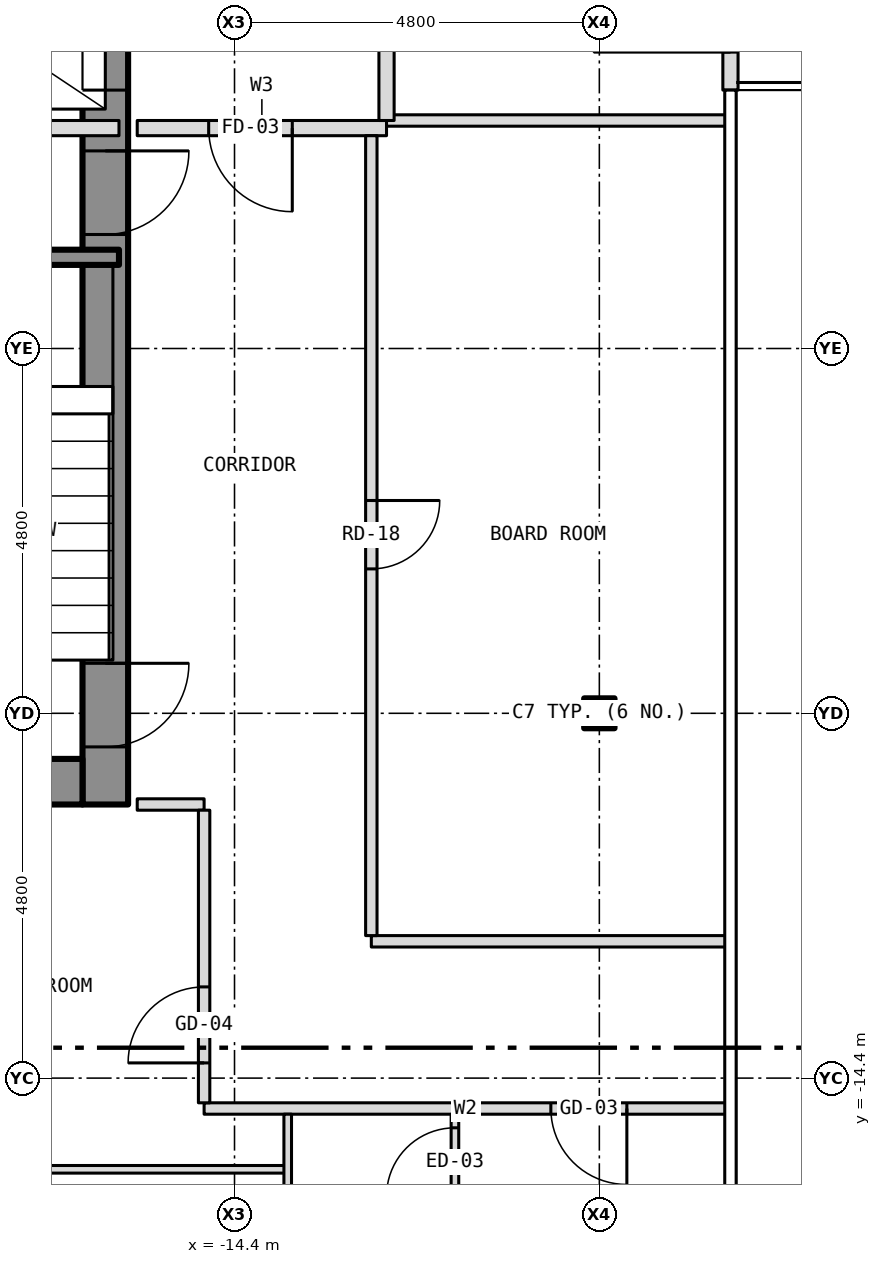
"""IFC4 building model, lengths in metres.
Left out: names, types, materials, properties, quantities, classifications, styles, units other than length and angle.
Written with IfcOpenShell. Run it as: python <this file> out.ifc"""

import sys

from ifc_helpers import new_model, si_unit, direction, frame, frame_2d, origin, origin_2d, place, context, subcontext, project, spatial, rectangle, i_section, extrude, element, fill, save


model = new_model("IFC4")
c1 = context("Model", 3, precision=1e-05, world=origin(), true_north=direction((0.0, 1.0)))
c2 = subcontext(c1, "Body", "Model", "MODEL_VIEW")
j1 = project(units=[si_unit("LENGTHUNIT", "METRE"), si_unit("PLANEANGLEUNIT", "RADIAN")], contexts=[c1])
p1 = place(None, origin())
s1 = spatial("IfcSite", under=j1, at=p1, CompositionType="ELEMENT")
p2 = place(p1, origin())
s2 = spatial("IfcBuilding", under=s1, at=p2, CompositionType="ELEMENT")
p3 = place(p2, frame((0.0, 0.0, 131.0)))
s3 = spatial("IfcBuildingStorey", under=s2, at=p3, CompositionType="ELEMENT", Elevation=131.0)
p4 = place(p3, frame((-9.6, -9.6, -0.15), z_axis=(0.0, 0.0, 1.0), x_axis=(1.0, 0.0, 0.0)))
e1 = element("IfcColumn", 1, at=p4, inside=s3, PredefinedType="COLUMN", context=c2, shape_type="SweptSolid", body=[
    extrude(i_section(OverallWidth=0.399, OverallDepth=0.394, WebThickness=0.023, FlangeThickness=0.037, at=origin_2d()), origin(), (0.0, 0.0, 1.0), 3.5),
])
p5 = place(p3, frame((-16.1, -10.8, 0.0), z_axis=(0.0, 0.0, 1.0), x_axis=(0.0, 1.0, 0.0)))
e2 = element("IfcWall", 2, at=p5, inside=s3, PredefinedType="SHEAR", context=c2, shape_type="SweptSolid", body=[
    extrude(rectangle(XDim=21.6, YDim=0.6, at=frame_2d((10.8, 0.0))), origin(), (0.0, 0.0, 1.0), 3.25),
])
p6 = place(p5, frame((9.4, 0.0, 0.0)))
e3 = element("IfcOpeningElement", 3, at=p6, cuts=e2, PredefinedType="OPENING", context=c2, shape_type="SweptSolid", body=[
    extrude(rectangle(XDim=1.1, YDim=2.1, at=frame_2d((0.55, 1.05))), frame((0.0, 0.312, 0.0), z_axis=(0.0, -1.0, 0.0), x_axis=(1.0, 0.0, 0.0)), (0.0, 0.0, 1.0), 0.624),
])
p7 = place(p5, frame((11.5, 0.0, 0.0)))
e4 = element("IfcOpeningElement", 4, at=p7, cuts=e2, PredefinedType="OPENING", context=c2, shape_type="SweptSolid", body=[
    extrude(rectangle(XDim=1.1, YDim=2.1, at=frame_2d((0.55, 1.05))), frame((0.0, 0.312, 0.0), z_axis=(0.0, -1.0, 0.0), x_axis=(1.0, 0.0, 0.0)), (0.0, 0.0, 1.0), 0.624),
])
p8 = place(p5, frame((13.6, 0.0, 0.0)))
e5 = element("IfcOpeningElement", 5, at=p8, cuts=e2, PredefinedType="OPENING", context=c2, shape_type="SweptSolid", body=[
    extrude(rectangle(XDim=1.1, YDim=2.1, at=frame_2d((0.55, 1.05))), frame((0.0, 0.312, 0.0), z_axis=(0.0, -1.0, 0.0), x_axis=(1.0, 0.0, 0.0)), (0.0, 0.0, 1.0), 0.624),
])
p9 = place(p5, frame((15.7, 0.0, 0.0)))
e6 = element("IfcOpeningElement", 6, at=p9, cuts=e2, PredefinedType="OPENING", context=c2, shape_type="SweptSolid", body=[
    extrude(rectangle(XDim=1.1, YDim=2.1, at=frame_2d((0.55, 1.05))), frame((0.0, 0.312, 0.0), z_axis=(0.0, -1.0, 0.0), x_axis=(1.0, 0.0, 0.0)), (0.0, 0.0, 1.0), 0.624),
])
p10 = place(p5, frame((17.8, 0.0, 0.0)))
e7 = element("IfcOpeningElement", 7, at=p10, cuts=e2, PredefinedType="OPENING", context=c2, shape_type="SweptSolid", body=[
    extrude(rectangle(XDim=1.1, YDim=2.1, at=frame_2d((0.55, 1.05))), frame((0.0, 0.312, 0.0), z_axis=(0.0, -1.0, 0.0), x_axis=(1.0, 0.0, 0.0)), (0.0, 0.0, 1.0), 0.624),
])
p11 = place(p5, frame((0.758, 0.0, 0.0)))
e8 = element("IfcOpeningElement", 8, at=p11, cuts=e2, PredefinedType="OPENING", context=c2, shape_type="SweptSolid", body=[
    extrude(rectangle(XDim=1.1, YDim=2.1, at=frame_2d((0.55, 1.05))), frame((0.0, 0.312, 0.0), z_axis=(0.0, -1.0, 0.0), x_axis=(1.0, 0.0, 0.0)), (0.0, 0.0, 1.0), 0.624),
])
p12 = place(p5, frame((7.5, 0.0, 0.0)))
e9 = element("IfcOpeningElement", 9, at=p12, cuts=e2, PredefinedType="OPENING", context=c2, shape_type="SweptSolid", body=[
    extrude(rectangle(XDim=1.1, YDim=2.1, at=frame_2d((0.55, 1.05))), frame((0.0, 0.312, 0.0), z_axis=(0.0, -1.0, 0.0), x_axis=(1.0, 0.0, 0.0)), (0.0, 0.0, 1.0), 0.624),
])
p13 = place(p3, frame((-22.2, -10.5, 0.0), z_axis=(0.0, 0.0, 1.0), x_axis=(1.0, 0.0, 0.0)))
e10 = element("IfcWall", 10, at=p13, inside=s3, PredefinedType="SHEAR", context=c2, shape_type="SweptSolid", body=[
    extrude(rectangle(XDim=5.8, YDim=0.6, at=frame_2d((2.9, 0.0))), origin(), (0.0, 0.0, 1.0), 3.25),
])
p14 = place(p3, frame((-7.875, -1.4, 0.0), z_axis=(0.0, 0.0, 1.0), x_axis=(0.0, 1.0, 0.0)))
e11 = element("IfcWall", 11, at=p14, inside=s3, PredefinedType="SOLIDWALL", context=c2, shape_type="SweptSolid", body=[
    extrude(rectangle(XDim=2.8, YDim=0.2, at=frame_2d((1.4, 0.0))), origin(), (0.0, 0.0, 1.0), 3.5),
])
p15 = place(p14, frame((0.5, 0.0, 0.0)))
e12 = element("IfcOpeningElement", 12, at=p15, cuts=e11, PredefinedType="OPENING", context=c2, shape_type="SweptSolid", body=[
    extrude(rectangle(XDim=1.8, YDim=2.1, at=frame_2d((0.9, 1.05))), frame((0.0, 0.112, 0.0), z_axis=(0.0, -1.0, 0.0), x_axis=(1.0, 0.0, 0.0)), (0.0, 0.0, 1.0), 0.224),
])
p16 = place(p3, frame((-23.28, -15.6, 0.0), z_axis=(0.0, 0.0, 1.0), x_axis=(1.0, 0.0, 0.0)))
e13 = element("IfcWall", 13, at=p16, inside=s3, PredefinedType="PARTITIONING", context=c2, shape_type="SweptSolid", body=[
    extrude(rectangle(XDim=9.58, YDim=0.1, at=frame_2d((4.79, 0.0))), origin(), (0.0, 0.0, 1.0), 3.35),
])
p17 = place(p16, frame((4.568, 0.0, 0.0)))
e14 = element("IfcOpeningElement", 14, at=p17, cuts=e13, PredefinedType="OPENING", context=c2, shape_type="SweptSolid", body=[
    extrude(rectangle(XDim=0.9, YDim=2.1, at=frame_2d((0.45, 1.05))), frame((0.0, 0.062, 0.0), z_axis=(0.0, -1.0, 0.0), x_axis=(1.0, 0.0, 0.0)), (0.0, 0.0, 1.0), 0.124),
])
p18 = place(p3, frame((-14.8, -14.8, 0.0), z_axis=(0.0, 0.0, 1.0), x_axis=(1.0, 0.0, 0.0)))
e15 = element("IfcWall", 15, at=p18, inside=s3, PredefinedType="PARTITIONING", context=c2, shape_type="SweptSolid", body=[
    extrude(rectangle(XDim=6.88, YDim=0.15, at=frame_2d((3.44, 0.0))), origin(), (0.0, 0.0, 1.0), 3.35),
])
p19 = place(p18, frame((4.562, 0.0, 0.0)))
e16 = element("IfcOpeningElement", 16, at=p19, cuts=e15, PredefinedType="OPENING", context=c2, shape_type="SweptSolid", body=[
    extrude(rectangle(XDim=1.0, YDim=2.1, at=frame_2d((0.5, 1.05))), frame((0.0, 0.087, 0.0), z_axis=(0.0, -1.0, 0.0), x_axis=(1.0, 0.0, 0.0)), (0.0, 0.0, 1.0), 0.174),
])
p20 = place(p3, frame((-12.6, -12.6, 0.0), z_axis=(0.0, 0.0, 1.0), x_axis=(1.0, 0.0, 0.0)))
e17 = element("IfcWall", 17, at=p20, inside=s3, PredefinedType="PARTITIONING", context=c2, shape_type="SweptSolid", body=[
    extrude(rectangle(XDim=4.68, YDim=0.15, at=frame_2d((2.34, 0.0))), origin(), (0.0, 0.0, 1.0), 3.35),
])
p21 = place(p3, frame((-15.68, -10.8, 0.0), z_axis=(0.0, 0.0, 1.0), x_axis=(1.0, 0.0, 0.0)))
e18 = element("IfcWall", 18, at=p21, inside=s3, PredefinedType="PARTITIONING", context=c2, shape_type="SweptSolid", body=[
    extrude(rectangle(XDim=0.88, YDim=0.15, at=frame_2d((0.44, 0.0))), origin(), (0.0, 0.0, 1.0), 3.35),
])
p22 = place(p3, frame((-20.0, -3.6, 0.0), z_axis=(0.0, 0.0, 1.0), x_axis=(1.0, 0.0, 0.0)))
e19 = element("IfcWall", 19, at=p22, inside=s3, PredefinedType="SHEAR", context=c2, shape_type="SweptSolid", body=[
    extrude(rectangle(XDim=4.08, YDim=0.2, at=frame_2d((2.04, 0.0))), origin(), (0.0, 0.0, 1.0), 3.25),
])
p23 = place(p3, frame((-22.68, -1.9, 0.0), z_axis=(0.0, 0.0, 1.0), x_axis=(1.0, 0.0, 0.0)))
e20 = element("IfcWall", 20, at=p23, inside=s3, PredefinedType="PARTITIONING", context=c2, shape_type="SweptSolid", body=[
    extrude(rectangle(XDim=6.76, YDim=0.2, at=frame_2d((3.38, 0.0))), origin(), (0.0, 0.0, 1.0), 3.25),
])
p24 = place(p23, frame((2.12, 0.0, 0.0)))
e21 = element("IfcOpeningElement", 21, at=p24, cuts=e20, PredefinedType="OPENING", context=c2, shape_type="SweptSolid", body=[
    extrude(rectangle(XDim=0.9, YDim=2.1, at=frame_2d((0.45, 1.05))), frame((0.0, 0.112, 0.0), z_axis=(0.0, -1.0, 0.0), x_axis=(1.0, 0.0, 0.0)), (0.0, 0.0, 1.0), 0.224),
])
p25 = place(p3, frame((-15.68, -1.9, 0.0), z_axis=(0.0, 0.0, 1.0), x_axis=(1.0, 0.0, 0.0)))
e22 = element("IfcWall", 22, at=p25, inside=s3, PredefinedType="PARTITIONING", context=c2, shape_type="SweptSolid", body=[
    extrude(rectangle(XDim=3.28, YDim=0.2, at=frame_2d((1.64, 0.0))), origin(), (0.0, 0.0, 1.0), 3.35),
])
p26 = place(p25, frame((0.94, 0.0, 0.0)))
e23 = element("IfcOpeningElement", 23, at=p26, cuts=e22, PredefinedType="OPENING", context=c2, shape_type="SweptSolid", body=[
    extrude(rectangle(XDim=1.1, YDim=2.1, at=frame_2d((0.55, 1.05))), frame((0.0, 0.112, 0.0), z_axis=(0.0, -1.0, 0.0), x_axis=(1.0, 0.0, 0.0)), (0.0, 0.0, 1.0), 0.224),
])
p27 = place(p3, frame((-12.4, -1.8, 0.0), z_axis=(0.0, 0.0, 1.0), x_axis=(1.0, 0.0, 0.0)))
e24 = element("IfcWall", 24, at=p27, inside=s3, PredefinedType="PARTITIONING", context=c2, shape_type="SweptSolid", body=[
    extrude(rectangle(XDim=4.48, YDim=0.15, at=frame_2d((2.24, 0.0))), origin(), (0.0, 0.0, 1.0), 3.35),
])
p28 = place(p3, frame((-14.8, -14.725, 0.0), z_axis=(0.0, 0.0, 1.0), x_axis=(0.0, 1.0, 0.0)))
e25 = element("IfcWall", 25, at=p28, inside=s3, PredefinedType="PARTITIONING", context=c2, shape_type="SweptSolid", body=[
    extrude(rectangle(XDim=3.85, YDim=0.15, at=frame_2d((1.925, 0.0))), origin(), (0.0, 0.0, 1.0), 3.35),
])
p29 = place(p28, frame((0.525, 0.0, 0.0)))
e26 = element("IfcOpeningElement", 26, at=p29, cuts=e25, PredefinedType="OPENING", context=c2, shape_type="SweptSolid", body=[
    extrude(rectangle(XDim=1.0, YDim=2.1, at=frame_2d((0.5, 1.05))), frame((0.0, 0.087, 0.0), z_axis=(0.0, -1.0, 0.0), x_axis=(1.0, 0.0, 0.0)), (0.0, 0.0, 1.0), 0.174),
])
p30 = place(p3, frame((-13.7, -22.68, 0.0), z_axis=(0.0, 0.0, 1.0), x_axis=(0.0, 1.0, 0.0)))
e27 = element("IfcWall", 27, at=p30, inside=s3, PredefinedType="PARTITIONING", context=c2, shape_type="SweptSolid", body=[
    extrude(rectangle(XDim=7.805, YDim=0.1, at=frame_2d((3.902, 0.0))), origin(), (0.0, 0.0, 1.0), 3.35),
])
p31 = place(p3, frame((-12.6, -12.525, 0.0), z_axis=(0.0, 0.0, 1.0), x_axis=(0.0, 1.0, 0.0)))
e28 = element("IfcWall", 28, at=p31, inside=s3, PredefinedType="PARTITIONING", context=c2, shape_type="SweptSolid", body=[
    extrude(rectangle(XDim=10.525, YDim=0.15, at=frame_2d((5.262, 0.0))), origin(), (0.0, 0.0, 1.0), 3.35),
])
p32 = place(p31, frame((4.825, 0.0, 0.0)))
e29 = element("IfcOpeningElement", 29, at=p32, cuts=e28, PredefinedType="OPENING", context=c2, shape_type="SweptSolid", body=[
    extrude(rectangle(XDim=0.9, YDim=2.1, at=frame_2d((0.45, 1.05))), frame((0.0, 0.087, 0.0), z_axis=(0.0, -1.0, 0.0), x_axis=(1.0, 0.0, 0.0)), (0.0, 0.0, 1.0), 0.174),
])
p33 = place(p3, frame((-12.4, -1.8, 0.0), z_axis=(0.0, 0.0, 1.0), x_axis=(0.0, 1.0, 0.0)))
e30 = element("IfcWall", 30, at=p33, inside=s3, PredefinedType="PARTITIONING", context=c2, shape_type="SweptSolid", body=[
    extrude(rectangle(XDim=4.0, YDim=0.2, at=frame_2d((2.0, 0.0))), origin(), (0.0, 0.0, 1.0), 3.35),
])
p34 = place(p33, frame((1.25, 0.0, 0.0)))
e31 = element("IfcOpeningElement", 31, at=p34, cuts=e30, PredefinedType="OPENING", context=c2, shape_type="SweptSolid", body=[
    extrude(rectangle(XDim=1.1, YDim=2.1, at=frame_2d((0.55, 1.05))), frame((0.0, 0.112, 0.0), z_axis=(0.0, -1.0, 0.0), x_axis=(1.0, 0.0, 0.0)), (0.0, 0.0, 1.0), 0.224),
])
p35 = place(p3, frame((-11.5, -17.95, 0.0), z_axis=(0.0, 0.0, 1.0), x_axis=(0.0, 1.0, 0.0)))
e32 = element("IfcWall", 32, at=p35, inside=s3, PredefinedType="PARTITIONING", context=c2, shape_type="SweptSolid", body=[
    extrude(rectangle(XDim=3.075, YDim=0.1, at=frame_2d((1.538, 0.0))), origin(), (0.0, 0.0, 1.0), 3.35),
])
p36 = place(p35, frame((1.996, 0.0, 0.0)))
e33 = element("IfcOpeningElement", 33, at=p36, cuts=e32, PredefinedType="OPENING", context=c2, shape_type="SweptSolid", body=[
    extrude(rectangle(XDim=0.9, YDim=2.1, at=frame_2d((0.45, 1.05))), frame((0.0, 0.062, 0.0), z_axis=(0.0, -1.0, 0.0), x_axis=(1.0, 0.0, 0.0)), (0.0, 0.0, 1.0), 0.124),
])
p37 = place(p15, origin())
e34 = element("IfcDoor", 34, at=p37, inside=s3, OperationType="DOUBLE_DOOR_DOUBLE_SWING", PredefinedType="DOOR", context=c2, shape_type="SweptSolid", body=[
    extrude(rectangle(XDim=1.8, YDim=2.1, at=frame_2d((0.9, 1.05))), frame((0.0, 0.025, 0.0), z_axis=(0.0, -1.0, 0.0), x_axis=(1.0, 0.0, 0.0)), (0.0, 0.0, 1.0), 0.05),
])
fill(e12, e34)
p38 = place(p6, origin())
e35 = element("IfcDoor", 35, at=p38, inside=s3, OperationType="SLIDING_TO_LEFT", PredefinedType="DOOR", context=c2, shape_type="SweptSolid", body=[
    extrude(rectangle(XDim=1.1, YDim=2.1, at=frame_2d((0.55, 1.05))), frame((0.0, 0.025, 0.0), z_axis=(0.0, -1.0, 0.0), x_axis=(1.0, 0.0, 0.0)), (0.0, 0.0, 1.0), 0.05),
])
fill(e3, e35)
p39 = place(p11, origin())
e36 = element("IfcDoor", 36, at=p39, inside=s3, OperationType="SINGLE_SWING_RIGHT", PredefinedType="DOOR", context=c2, shape_type="SweptSolid", body=[
    extrude(rectangle(XDim=1.1, YDim=2.1, at=frame_2d((0.55, 1.05))), frame((0.0, 0.025, 0.0), z_axis=(0.0, -1.0, 0.0), x_axis=(1.0, 0.0, 0.0)), (0.0, 0.0, 1.0), 0.05),
])
fill(e8, e36)
p40 = place(p12, origin())
e37 = element("IfcDoor", 37, at=p40, inside=s3, OperationType="SINGLE_SWING_RIGHT", PredefinedType="DOOR", context=c2, shape_type="SweptSolid", body=[
    extrude(rectangle(XDim=1.1, YDim=2.1, at=frame_2d((0.55, 1.05))), frame((0.0, 0.025, 0.0), z_axis=(0.0, -1.0, 0.0), x_axis=(1.0, 0.0, 0.0)), (0.0, 0.0, 1.0), 0.05),
])
fill(e9, e37)
p41 = place(p26, origin())
e38 = element("IfcDoor", 38, at=p41, inside=s3, OperationType="SINGLE_SWING_RIGHT", PredefinedType="DOOR", context=c2, shape_type="SweptSolid", body=[
    extrude(rectangle(XDim=1.1, YDim=2.1, at=frame_2d((0.55, 1.05))), frame((0.0, 0.025, 0.0), z_axis=(0.0, -1.0, 0.0), x_axis=(1.0, 0.0, 0.0)), (0.0, 0.0, 1.0), 0.05),
])
fill(e23, e38)
p42 = place(p19, origin())
e39 = element("IfcDoor", 39, at=p42, inside=s3, OperationType="SINGLE_SWING_RIGHT", PredefinedType="DOOR", context=c2, shape_type="SweptSolid", body=[
    extrude(rectangle(XDim=1.0, YDim=2.1, at=frame_2d((0.5, 1.05))), frame((0.0, 0.025, 0.0), z_axis=(0.0, -1.0, 0.0), x_axis=(1.0, 0.0, 0.0)), (0.0, 0.0, 1.0), 0.05),
])
fill(e16, e39)
p43 = place(p36, origin())
e40 = element("IfcDoor", 40, at=p43, inside=s3, OperationType="SINGLE_SWING_LEFT", PredefinedType="DOOR", context=c2, shape_type="SweptSolid", body=[
    extrude(rectangle(XDim=0.9, YDim=2.1, at=frame_2d((0.45, 1.05))), frame((0.0, 0.025, 0.0), z_axis=(0.0, -1.0, 0.0), x_axis=(1.0, 0.0, 0.0)), (0.0, 0.0, 1.0), 0.05),
])
fill(e33, e40)
p44 = place(p29, origin())
e41 = element("IfcDoor", 41, at=p44, inside=s3, OperationType="SINGLE_SWING_LEFT", PredefinedType="DOOR", context=c2, shape_type="SweptSolid", body=[
    extrude(rectangle(XDim=1.0, YDim=2.1, at=frame_2d((0.5, 1.05))), frame((0.0, 0.025, 0.0), z_axis=(0.0, -1.0, 0.0), x_axis=(1.0, 0.0, 0.0)), (0.0, 0.0, 1.0), 0.05),
])
fill(e26, e41)
p45 = place(p32, origin())
e42 = element("IfcDoor", 42, at=p45, inside=s3, OperationType="SINGLE_SWING_RIGHT", PredefinedType="DOOR", context=c2, shape_type="SweptSolid", body=[
    extrude(rectangle(XDim=0.9, YDim=2.1, at=frame_2d((0.45, 1.05))), frame((0.0, 0.025, 0.0), z_axis=(0.0, -1.0, 0.0), x_axis=(1.0, 0.0, 0.0)), (0.0, 0.0, 1.0), 0.05),
])
fill(e29, e42)
save(model, sys.argv[1])
